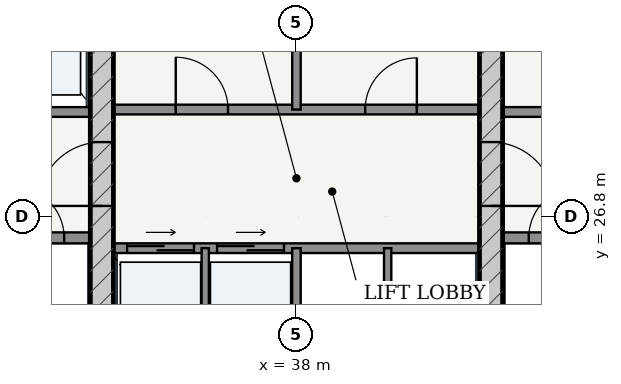
"""IFC4 building model, lengths in metres.
Left out: names, types, materials, properties, quantities, classifications, styles, units other than length and angle.
Written with IfcOpenShell. Run it as: python <this file> out.ifc"""

import sys

from ifc_helpers import new_model, si_unit, direction, frame, frame_2d, origin, place, context, subcontext, project, spatial, rectangle, extrude, source, transform, mapped, element, fill, save


model = new_model("IFC4")
c1 = context("Model", 3, precision=1e-05, world=origin(), true_north=direction((-0.2419218956, 0.970295726276)))
c2 = subcontext(c1, "Body", "Model", "MODEL_VIEW")
j1 = project(units=[si_unit("LENGTHUNIT", "METRE"), si_unit("PLANEANGLEUNIT", "RADIAN")], contexts=[c1])
p1 = place(None, origin())
s1 = spatial("IfcSite", under=j1, at=p1, CompositionType="ELEMENT")
p2 = place(p1, origin())
s2 = spatial("IfcBuilding", under=s1, at=p2, CompositionType="ELEMENT")
p3 = place(p2, frame((0.0, 0.0, 239.3)))
s3 = spatial("IfcBuildingStorey", under=s2, at=p3, CompositionType="ELEMENT", Elevation=239.3)
p4 = place(p3, frame((34.8, 19.175, 0.0), z_axis=(0.0, 0.0, 1.0), x_axis=(0.0, 1.0, 0.0)))
e1 = element("IfcWall", 1, at=p4, inside=s3, PredefinedType="SHEAR", context=c2, shape_type="SweptSolid", body=[
    extrude(rectangle(XDim=15.25, YDim=0.38, at=frame_2d((7.625, 0.0))), origin(), (0.0, 0.0, 1.0), 3.25),
])
p5 = place(p4, frame((7.8, 0.0, 0.0)))
e2 = element("IfcOpeningElement", 2, at=p5, cuts=e1, PredefinedType="OPENING", context=c2, shape_type="SweptSolid", body=[
    extrude(rectangle(XDim=1.05, YDim=2.15, at=frame_2d((0.525, 1.075))), frame((0.0, 0.2, 0.0), z_axis=(0.0, -1.0, 0.0), x_axis=(1.0, 0.0, 0.0)), (0.0, 0.0, 1.0), 0.4),
])
p6 = place(p3, frame((41.2, 19.175, 0.0), z_axis=(0.0, 0.0, 1.0), x_axis=(0.0, 1.0, 0.0)))
e3 = element("IfcWall", 3, at=p6, inside=s3, PredefinedType="SHEAR", context=c2, shape_type="SweptSolid", body=[
    extrude(rectangle(XDim=15.25, YDim=0.38, at=frame_2d((7.625, 0.0))), origin(), (0.0, 0.0, 1.0), 3.25),
])
p7 = place(p6, frame((7.8, 0.0, 0.0)))
e4 = element("IfcOpeningElement", 4, at=p7, cuts=e3, PredefinedType="OPENING", context=c2, shape_type="SweptSolid", body=[
    extrude(rectangle(XDim=1.05, YDim=2.15, at=frame_2d((0.525, 1.075))), frame((0.0, 0.2, 0.0), z_axis=(0.0, -1.0, 0.0), x_axis=(1.0, 0.0, 0.0)), (0.0, 0.0, 1.0), 0.4),
])
p8 = place(p3, frame((32.9, 26.45, 0.0), z_axis=(0.0, 0.0, 1.0), x_axis=(1.0, 0.0, 0.0)))
e5 = element("IfcWall", 5, at=p8, inside=s3, PredefinedType="PARTITIONING", context=c2, shape_type="SweptSolid", body=[
    extrude(rectangle(XDim=1.71, YDim=0.18, at=frame_2d((0.855, 0.0))), origin(), (0.0, 0.0, 1.0), 3.25),
])
p9 = place(p8, frame((0.43, 0.0, 0.0)))
e6 = element("IfcOpeningElement", 6, at=p9, cuts=e5, PredefinedType="OPENING", context=c2, shape_type="SweptSolid", body=[
    extrude(rectangle(XDim=0.85, YDim=2.1, at=frame_2d((0.425, 1.05))), frame((0.0, 0.1, 0.0), z_axis=(0.0, -1.0, 0.0), x_axis=(1.0, 0.0, 0.0)), (0.0, 0.0, 1.0), 0.2),
])
p10 = place(p3, frame((41.39, 26.45, 0.0), z_axis=(0.0, 0.0, 1.0), x_axis=(1.0, 0.0, 0.0)))
e7 = element("IfcWall", 7, at=p10, inside=s3, PredefinedType="PARTITIONING", context=c2, shape_type="SweptSolid", body=[
    extrude(rectangle(XDim=1.71, YDim=0.18, at=frame_2d((0.855, 0.0))), origin(), (0.0, 0.0, 1.0), 3.25),
])
p11 = place(p10, frame((0.43, 0.0, 0.0)))
e8 = element("IfcOpeningElement", 8, at=p11, cuts=e7, PredefinedType="OPENING", context=c2, shape_type="SweptSolid", body=[
    extrude(rectangle(XDim=0.85, YDim=2.1, at=frame_2d((0.425, 1.05))), frame((0.0, 0.1, 0.0), z_axis=(0.0, -1.0, 0.0), x_axis=(1.0, 0.0, 0.0)), (0.0, 0.0, 1.0), 0.2),
])
for number, where, z_axis, x_axis in (
    (9, (32.77, 28.52, 0.0), (0.0, 0.0, 1.0), (1.0, 0.0, 0.0)),
    (10, (41.39, 28.52, 0.0), (0.0, 0.0, 1.0), (1.0, 0.0, 0.0)),
):
    element("IfcWall", number, at=place(p3, frame(where, z_axis=z_axis, x_axis=x_axis)), inside=s3, PredefinedType="PARTITIONING", context=c2, shape_type="SweptSolid", body=[
        extrude(rectangle(XDim=1.84, YDim=0.16, at=frame_2d((0.92, 0.0))), origin(), (0.0, 0.0, 1.0), 3.25),
    ])
p12 = place(p3, frame((34.99, 28.56, 0.0), z_axis=(0.0, 0.0, 1.0), x_axis=(1.0, 0.0, 0.0)))
e11 = element("IfcWall", 11, at=p12, inside=s3, PredefinedType="PARTITIONING", context=c2, shape_type="SweptSolid", body=[
    extrude(rectangle(XDim=6.02, YDim=0.16, at=frame_2d((3.01, 0.0))), origin(), (0.0, 0.0, 1.0), 3.25),
])
p13 = place(p12, frame((1.025, 0.0, 0.0)))
e12 = element("IfcOpeningElement", 12, at=p13, cuts=e11, PredefinedType="OPENING", context=c2, shape_type="SweptSolid", body=[
    extrude(rectangle(XDim=0.86, YDim=2.1, at=frame_2d((0.43, 1.05))), frame((0.0, 0.09, 0.0), z_axis=(0.0, -1.0, 0.0), x_axis=(1.0, 0.0, 0.0)), (0.0, 0.0, 1.0), 0.18),
])
p14 = place(p12, frame((4.14, 0.0, 0.0)))
e13 = element("IfcOpeningElement", 13, at=p14, cuts=e11, PredefinedType="OPENING", context=c2, shape_type="SweptSolid", body=[
    extrude(rectangle(XDim=0.85, YDim=2.1, at=frame_2d((0.425, 1.05))), frame((0.0, 0.09, 0.0), z_axis=(0.0, -1.0, 0.0), x_axis=(1.0, 0.0, 0.0)), (0.0, 0.0, 1.0), 0.18),
])
p15 = place(p3, frame((38.0, 28.56, 0.0), z_axis=(0.0, 0.0, 1.0), x_axis=(0.0, 1.0, 0.0)))
e14 = element("IfcWall", 14, at=p15, inside=s3, PredefinedType="PARTITIONING", context=c2, shape_type="SweptSolid", body=[
    extrude(rectangle(XDim=5.865, YDim=0.14, at=frame_2d((2.933, 0.0))), origin(), (0.0, 0.0, 1.0), 3.25),
])
p16 = place(p3, frame((34.99, 26.28, 0.0), z_axis=(0.0, 0.0, 1.0), x_axis=(1.0, 0.0, 0.0)))
e15 = element("IfcWall", 15, at=p16, inside=s3, PredefinedType="PARTITIONING", context=c2, shape_type="SweptSolid", body=[
    extrude(rectangle(XDim=6.02, YDim=0.16, at=frame_2d((3.01, 0.0))), origin(), (0.0, 0.0, 1.0), 3.25),
])
p17 = place(p16, frame((0.225, 0.0, 0.0)))
e16 = element("IfcOpeningElement", 16, at=p17, cuts=e15, PredefinedType="OPENING", context=c2, shape_type="SweptSolid", body=[
    extrude(rectangle(XDim=1.1, YDim=2.2, at=frame_2d((0.55, 1.1))), frame((0.0, 0.09, 0.0), z_axis=(0.0, -1.0, 0.0), x_axis=(1.0, 0.0, 0.0)), (0.0, 0.0, 1.0), 0.18),
])
p18 = place(p16, frame((1.705, 0.0, 0.0)))
e17 = element("IfcOpeningElement", 17, at=p18, cuts=e15, PredefinedType="OPENING", context=c2, shape_type="SweptSolid", body=[
    extrude(rectangle(XDim=1.1, YDim=2.2, at=frame_2d((0.55, 1.1))), frame((0.0, 0.09, 0.0), z_axis=(0.0, -1.0, 0.0), x_axis=(1.0, 0.0, 0.0)), (0.0, 0.0, 1.0), 0.18),
])
p19 = place(p3, frame((36.5, 23.72, 0.0), z_axis=(0.0, 0.0, 1.0), x_axis=(0.0, 1.0, 0.0)))
e18 = element("IfcWall", 18, at=p19, inside=s3, PredefinedType="PARTITIONING", context=c2, shape_type="SweptSolid", body=[
    extrude(rectangle(XDim=2.56, YDim=0.12, at=frame_2d((1.28, 0.0))), origin(), (0.0, 0.0, 1.0), 3.25),
])
p20 = place(p3, frame((38.0, 23.72, 0.0), z_axis=(0.0, 0.0, 1.0), x_axis=(0.0, 1.0, 0.0)))
e19 = element("IfcWall", 19, at=p20, inside=s3, PredefinedType="PARTITIONING", context=c2, shape_type="SweptSolid", body=[
    extrude(rectangle(XDim=2.56, YDim=0.14, at=frame_2d((1.28, 0.0))), origin(), (0.0, 0.0, 1.0), 3.25),
])
p21 = place(p3, frame((39.5, 23.72, 0.0), z_axis=(0.0, 0.0, 1.0), x_axis=(0.0, 1.0, 0.0)))
e20 = element("IfcWall", 20, at=p21, inside=s3, PredefinedType="PARTITIONING", context=c2, shape_type="SweptSolid", body=[
    extrude(rectangle(XDim=2.56, YDim=0.12, at=frame_2d((1.28, 0.0))), origin(), (0.0, 0.0, 1.0), 3.25),
])
m1 = source(origin(), c2, "Body", "SweptSolid", [
    extrude(rectangle(XDim=1.05, YDim=2.15, at=frame_2d((0.525, 1.075))), frame((0.0, 0.025, 0.0), z_axis=(0.0, -1.0, 0.0), x_axis=(1.0, 0.0, 0.0)), (0.0, 0.0, 1.0), 0.05),
])
p22 = place(p5, origin())
e21 = element("IfcDoor", 21, at=p22, inside=s3, OperationType="SINGLE_SWING_LEFT", PredefinedType="DOOR", context=c2, shape_type="MappedRepresentation", body=[
    mapped(m1, transform((0.0, 0.0, 0.0), scale=1.0)),
])
fill(e2, e21)
p23 = place(p7, frame((1.05, 0.0, 0.0), z_axis=(0.0, 0.0, 1.0), x_axis=(-1.0, 0.0, 0.0)))
e22 = element("IfcDoor", 22, at=p23, inside=s3, OperationType="SINGLE_SWING_RIGHT", PredefinedType="DOOR", context=c2, shape_type="MappedRepresentation", body=[
    mapped(m1, transform((0.0, 0.0, 0.0), scale=1.0)),
])
fill(e4, e22)
m2 = source(origin(), c2, "Body", "SweptSolid", [
    extrude(rectangle(XDim=0.85, YDim=2.1, at=frame_2d((0.425, 1.05))), frame((0.0, 0.025, 0.0), z_axis=(0.0, -1.0, 0.0), x_axis=(1.0, 0.0, 0.0)), (0.0, 0.0, 1.0), 0.05),
])
p24 = place(p9, origin())
e23 = element("IfcDoor", 23, at=p24, inside=s3, OperationType="SINGLE_SWING_LEFT", PredefinedType="DOOR", context=c2, shape_type="MappedRepresentation", body=[
    mapped(m2, transform((0.0, 0.0, 0.0), scale=1.0)),
])
fill(e6, e23)
p25 = place(p11, origin())
e24 = element("IfcDoor", 24, at=p25, inside=s3, OperationType="SINGLE_SWING_RIGHT", PredefinedType="DOOR", context=c2, shape_type="MappedRepresentation", body=[
    mapped(m2, transform((0.0, 0.0, 0.0), scale=1.0)),
])
fill(e8, e24)
m3 = source(origin(), c2, "Body", "SweptSolid", [
    extrude(rectangle(XDim=0.86, YDim=2.1, at=frame_2d((0.43, 1.05))), frame((0.0, 0.025, 0.0), z_axis=(0.0, -1.0, 0.0), x_axis=(1.0, 0.0, 0.0)), (0.0, 0.0, 1.0), 0.05),
])
p26 = place(p13, origin())
e25 = element("IfcDoor", 25, at=p26, inside=s3, OperationType="SINGLE_SWING_LEFT", PredefinedType="DOOR", context=c2, shape_type="MappedRepresentation", body=[
    mapped(m3, transform((0.0, 0.0, 0.0), scale=1.0)),
])
fill(e12, e25)
p27 = place(p14, origin())
e26 = element("IfcDoor", 26, at=p27, inside=s3, OperationType="SINGLE_SWING_RIGHT", PredefinedType="DOOR", context=c2, shape_type="MappedRepresentation", body=[
    mapped(m2, transform((0.0, 0.0, 0.0), scale=1.0)),
])
fill(e13, e26)
m4 = source(origin(), c2, "Body", "SweptSolid", [
    extrude(rectangle(XDim=1.1, YDim=2.2, at=frame_2d((0.55, 1.1))), frame((0.0, 0.025, 0.0), z_axis=(0.0, -1.0, 0.0), x_axis=(1.0, 0.0, 0.0)), (0.0, 0.0, 1.0), 0.05),
])
p28 = place(p17, origin())
e27 = element("IfcDoor", 27, at=p28, inside=s3, OperationType="DOUBLE_DOOR_SLIDING", PredefinedType="DOOR", context=c2, shape_type="MappedRepresentation", body=[
    mapped(m4, transform((0.0, 0.0, 0.0), scale=1.0)),
])
fill(e16, e27)
p29 = place(p18, origin())
e28 = element("IfcDoor", 28, at=p29, inside=s3, OperationType="DOUBLE_DOOR_SLIDING", PredefinedType="DOOR", context=c2, shape_type="MappedRepresentation", body=[
    mapped(m4, transform((0.0, 0.0, 0.0), scale=1.0)),
])
fill(e17, e28)
save(model, sys.argv[1])
